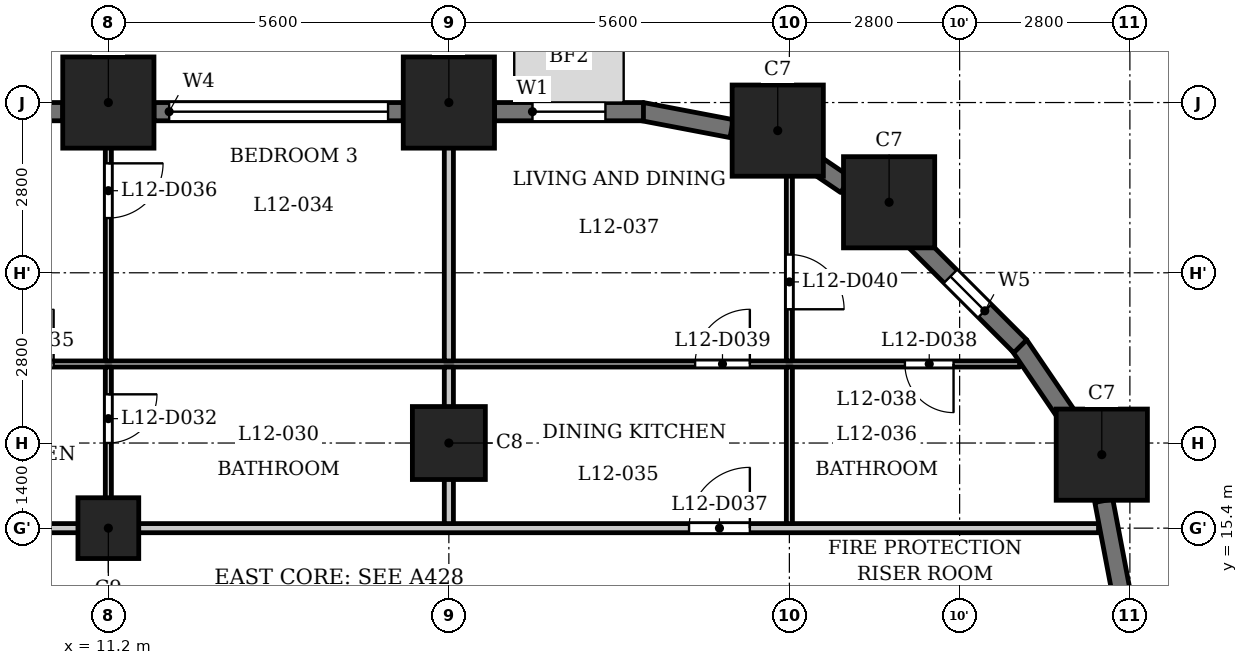
"""IFC4 building model, lengths in metres.
Left out: names, types, materials, properties, quantities, classifications, styles, units other than length and angle.
Written with IfcOpenShell. Run it as: python <this file> out.ifc"""

import sys

from ifc_helpers import new_model, si_unit, direction, frame, frame_2d, origin, origin_2d, place, context, subcontext, project, spatial, rectangle, extrude, element, fill, save


model = new_model("IFC4")
c1 = context("Model", 3, precision=1e-05, world=origin(), true_north=direction((0.0, 1.0)))
c2 = subcontext(c1, "Body", "Model", "MODEL_VIEW")
j1 = project(units=[si_unit("LENGTHUNIT", "METRE"), si_unit("PLANEANGLEUNIT", "RADIAN")], contexts=[c1])
p1 = place(None, origin())
s1 = spatial("IfcSite", under=j1, at=p1, CompositionType="ELEMENT")
p2 = place(p1, origin())
s2 = spatial("IfcBuilding", under=s1, at=p2, CompositionType="ELEMENT")
p3 = place(p2, frame((0.0, 0.0, 51.5)))
s3 = spatial("IfcBuildingStorey", under=s2, at=p3, CompositionType="ELEMENT", Elevation=51.5)
for number, where, z_axis, x_axis in (
    (1, (27.538, 16.609, 0.0), (0.0, 0.0, 1.0), (1.0, 0.0, 0.0)),
    (2, (24.04, 20.76, 0.0), (0.0, 0.0, 1.0), (1.0, 0.0, 0.0)),
    (3, (22.209, 21.938, 0.0), (0.0, 0.0, 1.0), (1.0, 0.0, 0.0)),
    (4, (16.8, 22.4, 0.0), (0.0, 0.0, 1.0), (1.0, 0.0, 0.0)),
    (5, (11.2, 22.4, 0.0), (0.0, 0.0, 1.0), (1.0, 0.0, 0.0)),
):
    element("IfcColumn", number, at=place(p3, frame(where, z_axis=z_axis, x_axis=x_axis)), inside=s3, PredefinedType="COLUMN", context=c2, shape_type="SweptSolid", body=[
        extrude(rectangle(XDim=1.5, YDim=1.5, at=origin_2d()), origin(), (0.0, 0.0, 1.0), 3.5),
    ])
p4 = place(p3, frame((16.8, 16.8, 0.0), z_axis=(0.0, 0.0, 1.0), x_axis=(1.0, 0.0, 0.0)))
e6 = element("IfcColumn", 6, at=p4, inside=s3, PredefinedType="COLUMN", context=c2, shape_type="SweptSolid", body=[
    extrude(rectangle(XDim=1.2, YDim=1.2, at=origin_2d()), origin(), (0.0, 0.0, 1.0), 3.5),
])
p5 = place(p3, frame((11.2, 15.4, 0.0), z_axis=(0.0, 0.0, 1.0), x_axis=(1.0, 0.0, 0.0)))
e7 = element("IfcColumn", 7, at=p5, inside=s3, PredefinedType="COLUMN", context=c2, shape_type="SweptSolid", body=[
    extrude(rectangle(XDim=1.0, YDim=1.0, at=origin_2d()), origin(), (0.0, 0.0, 1.0), 3.5),
])
for number, where, z_axis, x_axis in (
    (8, (27.853, 14.372, 0.0), (0.0, 0.0, 1.0), (-0.187, 0.982, 0.0)),
    (9, (27.025, 17.167, 0.0), (0.0, 0.0, 1.0), (-0.562, 0.827, 0.0)),
):
    element("IfcWall", number, at=place(p3, frame(where, z_axis=z_axis, x_axis=x_axis)), inside=s3, PredefinedType="SOLIDWALL", context=c2, shape_type="SweptSolid", body=[
        extrude(rectangle(XDim=1.506, YDim=0.3, at=frame_2d((0.753, 0.0))), origin(), (0.0, 0.0, 1.0), 2.35),
    ])
p6 = place(p3, frame((26.197, 18.391, 0.0), z_axis=(0.0, 0.0, 1.0), x_axis=(-0.707106781187, 0.707106781187, 0.0)))
e10 = element("IfcWall", 10, at=p6, inside=s3, PredefinedType="SOLIDWALL", context=c2, shape_type="SweptSolid", body=[
    extrude(rectangle(XDim=2.45, YDim=0.3, at=frame_2d((1.225, 0.0))), origin(), (0.0, 0.0, 1.0), 2.35),
])
p7 = place(p6, frame((0.825, 0.0, 0.6)))
e11 = element("IfcOpeningElement", 11, at=p7, cuts=e10, PredefinedType="OPENING", context=c2, shape_type="SweptSolid", body=[
    extrude(rectangle(XDim=0.8, YDim=1.55, at=frame_2d((0.4, 0.775))), frame((0.0, 0.16, 0.0), z_axis=(0.0, -1.0, 0.0), x_axis=(1.0, 0.0, 0.0)), (0.0, 0.0, 1.0), 0.32),
])
p8 = place(p3, frame((23.327, 21.045, 0.0), z_axis=(0.0, 0.0, 1.0), x_axis=(-0.827080706709, 0.562083182981, 0.0)))
e12 = element("IfcWall", 12, at=p8, inside=s3, PredefinedType="SOLIDWALL", context=c2, shape_type="SweptSolid", body=[
    extrude(rectangle(XDim=0.677, YDim=0.3, at=frame_2d((0.339, 0.0))), origin(), (0.0, 0.0, 1.0), 3.2),
])
p9 = place(p3, frame((21.451, 21.97, 0.0), z_axis=(0.0, 0.0, 1.0), x_axis=(-0.982287454367, 0.187380247071, 0.0)))
e13 = element("IfcWall", 13, at=p9, inside=s3, PredefinedType="SOLIDWALL", context=c2, shape_type="SweptSolid", body=[
    extrude(rectangle(XDim=1.506, YDim=0.3, at=frame_2d((0.753, 0.0))), origin(), (0.0, 0.0, 1.0), 2.35),
])
p10 = place(p3, frame((20.0, 22.25, 0.0), z_axis=(0.0, 0.0, 1.0), x_axis=(-1.0, 0.0, 0.0)))
e14 = element("IfcWall", 14, at=p10, inside=s3, PredefinedType="SOLIDWALL", context=c2, shape_type="SweptSolid", body=[
    extrude(rectangle(XDim=2.45, YDim=0.3, at=frame_2d((1.225, 0.0))), origin(), (0.0, 0.0, 1.0), 2.35),
])
p11 = place(p10, frame((0.625, 0.0, 0.6)))
e15 = element("IfcOpeningElement", 15, at=p11, cuts=e14, PredefinedType="OPENING", context=c2, shape_type="SweptSolid", body=[
    extrude(rectangle(XDim=1.2, YDim=1.55, at=frame_2d((0.6, 0.775))), frame((0.0, 0.16, 0.0), z_axis=(0.0, -1.0, 0.0), x_axis=(1.0, 0.0, 0.0)), (0.0, 0.0, 1.0), 0.32),
])
p12 = place(p3, frame((16.05, 22.25, 0.0), z_axis=(0.0, 0.0, 1.0), x_axis=(-1.0, 0.0, 0.0)))
e16 = element("IfcWall", 16, at=p12, inside=s3, PredefinedType="SOLIDWALL", context=c2, shape_type="SweptSolid", body=[
    extrude(rectangle(XDim=4.1, YDim=0.3, at=frame_2d((2.05, 0.0))), origin(), (0.0, 0.0, 1.0), 2.35),
])
p13 = place(p12, frame((0.25, 0.0, 1.2)))
e17 = element("IfcOpeningElement", 17, at=p13, cuts=e16, PredefinedType="OPENING", context=c2, shape_type="SweptSolid", body=[
    extrude(rectangle(XDim=3.6, YDim=0.95, at=frame_2d((1.8, 0.475))), frame((0.0, 0.16, 0.0), z_axis=(0.0, -1.0, 0.0), x_axis=(1.0, 0.0, 0.0)), (0.0, 0.0, 1.0), 0.32),
])
p14 = place(p3, frame((10.45, 22.25, 0.0), z_axis=(0.0, 0.0, 1.0), x_axis=(-1.0, 0.0, 0.0)))
e18 = element("IfcWall", 18, at=p14, inside=s3, PredefinedType="SOLIDWALL", context=c2, shape_type="SweptSolid", body=[
    extrude(rectangle(XDim=4.1, YDim=0.3, at=frame_2d((2.05, 0.0))), origin(), (0.0, 0.0, 1.0), 2.35),
])
p15 = place(p14, frame((0.25, 0.0, 1.2)))
e19 = element("IfcOpeningElement", 19, at=p15, cuts=e18, PredefinedType="OPENING", context=c2, shape_type="SweptSolid", body=[
    extrude(rectangle(XDim=3.6, YDim=0.95, at=frame_2d((1.8, 0.475))), frame((0.0, 0.16, 0.0), z_axis=(0.0, -1.0, 0.0), x_axis=(1.0, 0.0, 0.0)), (0.0, 0.0, 1.0), 0.32),
])
p16 = place(p3, frame((-27.484, 15.4, 0.0), z_axis=(0.0, 0.0, 1.0), x_axis=(1.0, 0.0, 0.0)))
e20 = element("IfcWall", 20, at=p16, inside=s3, PredefinedType="PARTITIONING", context=c2, shape_type="SweptSolid", body=[
    extrude(rectangle(XDim=54.968, YDim=0.15, at=frame_2d((27.484, 0.0))), origin(), (0.0, 0.0, 1.0), 3.2),
])
p17 = place(p16, frame((8.784, 0.0, 0.0)))
e21 = element("IfcOpeningElement", 21, at=p17, cuts=e20, PredefinedType="OPENING", context=c2, shape_type="SweptSolid", body=[
    extrude(rectangle(XDim=1.0, YDim=2.1, at=frame_2d((0.5, 1.05))), frame((0.0, 0.085, 0.0), z_axis=(0.0, -1.0, 0.0), x_axis=(1.0, 0.0, 0.0)), (0.0, 0.0, 1.0), 0.17),
])
p18 = place(p16, frame((12.034, 0.0, 0.0)))
e22 = element("IfcOpeningElement", 22, at=p18, cuts=e20, PredefinedType="OPENING", context=c2, shape_type="SweptSolid", body=[
    extrude(rectangle(XDim=1.0, YDim=2.1, at=frame_2d((0.5, 1.05))), frame((0.0, 0.085, 0.0), z_axis=(0.0, -1.0, 0.0), x_axis=(1.0, 0.0, 0.0)), (0.0, 0.0, 1.0), 0.17),
])
p19 = place(p16, frame((16.984, 0.0, 0.0)))
e23 = element("IfcOpeningElement", 23, at=p19, cuts=e20, PredefinedType="OPENING", context=c2, shape_type="SweptSolid", body=[
    extrude(rectangle(XDim=1.0, YDim=2.1, at=frame_2d((0.5, 1.05))), frame((0.0, 0.085, 0.0), z_axis=(0.0, -1.0, 0.0), x_axis=(1.0, 0.0, 0.0)), (0.0, 0.0, 1.0), 0.17),
])
p20 = place(p16, frame((28.184, 0.0, 0.0)))
e24 = element("IfcOpeningElement", 24, at=p20, cuts=e20, PredefinedType="OPENING", context=c2, shape_type="SweptSolid", body=[
    extrude(rectangle(XDim=1.0, YDim=2.1, at=frame_2d((0.5, 1.05))), frame((0.0, 0.085, 0.0), z_axis=(0.0, -1.0, 0.0), x_axis=(1.0, 0.0, 0.0)), (0.0, 0.0, 1.0), 0.17),
])
p21 = place(p16, frame((48.234, 0.0, 0.0)))
e25 = element("IfcOpeningElement", 25, at=p21, cuts=e20, PredefinedType="OPENING", context=c2, shape_type="SweptSolid", body=[
    extrude(rectangle(XDim=1.0, YDim=2.1, at=frame_2d((0.5, 1.05))), frame((0.0, 0.085, 0.0), z_axis=(0.0, -1.0, 0.0), x_axis=(1.0, 0.0, 0.0)), (0.0, 0.0, 1.0), 0.17),
])
p22 = place(p3, frame((-26.44, 18.1, 0.0), z_axis=(0.0, 0.0, 1.0), x_axis=(1.0, 0.0, 0.0)))
e26 = element("IfcWall", 26, at=p22, inside=s3, PredefinedType="PARTITIONING", context=c2, shape_type="SweptSolid", body=[
    extrude(rectangle(XDim=52.63, YDim=0.1, at=frame_2d((26.315, 0.0))), origin(), (0.0, 0.0, 1.0), 3.2),
])
p23 = place(p22, frame((2.626, 0.0, 0.0)))
e27 = element("IfcOpeningElement", 27, at=p23, cuts=e26, PredefinedType="OPENING", context=c2, shape_type="SweptSolid", body=[
    extrude(rectangle(XDim=0.8, YDim=2.1, at=frame_2d((0.4, 1.05))), frame((0.0, 0.06, 0.0), z_axis=(0.0, -1.0, 0.0), x_axis=(1.0, 0.0, 0.0)), (0.0, 0.0, 1.0), 0.12),
])
p24 = place(p22, frame((7.84, 0.0, 0.0)))
e28 = element("IfcOpeningElement", 28, at=p24, cuts=e26, PredefinedType="OPENING", context=c2, shape_type="SweptSolid", body=[
    extrude(rectangle(XDim=0.9, YDim=2.1, at=frame_2d((0.45, 1.05))), frame((0.0, 0.06, 0.0), z_axis=(0.0, -1.0, 0.0), x_axis=(1.0, 0.0, 0.0)), (0.0, 0.0, 1.0), 0.12),
])
p25 = place(p22, frame((13.79, 0.0, 0.0)))
e29 = element("IfcOpeningElement", 29, at=p25, cuts=e26, PredefinedType="OPENING", context=c2, shape_type="SweptSolid", body=[
    extrude(rectangle(XDim=0.8, YDim=2.1, at=frame_2d((0.4, 1.05))), frame((0.0, 0.06, 0.0), z_axis=(0.0, -1.0, 0.0), x_axis=(1.0, 0.0, 0.0)), (0.0, 0.0, 1.0), 0.12),
])
p26 = place(p22, frame((11.09, 0.0, 0.0)))
e30 = element("IfcOpeningElement", 30, at=p26, cuts=e26, PredefinedType="OPENING", context=c2, shape_type="SweptSolid", body=[
    extrude(rectangle(XDim=0.9, YDim=2.1, at=frame_2d((0.45, 1.05))), frame((0.0, 0.06, 0.0), z_axis=(0.0, -1.0, 0.0), x_axis=(1.0, 0.0, 0.0)), (0.0, 0.0, 1.0), 0.12),
])
p27 = place(p22, frame((21.49, 0.0, 0.0)))
e31 = element("IfcOpeningElement", 31, at=p27, cuts=e26, PredefinedType="OPENING", context=c2, shape_type="SweptSolid", body=[
    extrude(rectangle(XDim=0.8, YDim=2.1, at=frame_2d((0.4, 1.05))), frame((0.0, 0.06, 0.0), z_axis=(0.0, -1.0, 0.0), x_axis=(1.0, 0.0, 0.0)), (0.0, 0.0, 1.0), 0.12),
])
p28 = place(p22, frame((15.79, 0.0, 0.0)))
e32 = element("IfcOpeningElement", 32, at=p28, cuts=e26, PredefinedType="OPENING", context=c2, shape_type="SweptSolid", body=[
    extrude(rectangle(XDim=0.9, YDim=2.1, at=frame_2d((0.45, 1.05))), frame((0.0, 0.06, 0.0), z_axis=(0.0, -1.0, 0.0), x_axis=(1.0, 0.0, 0.0)), (0.0, 0.0, 1.0), 0.12),
])
p29 = place(p22, frame((27.49, 0.0, 0.0)))
e33 = element("IfcOpeningElement", 33, at=p29, cuts=e26, PredefinedType="OPENING", context=c2, shape_type="SweptSolid", body=[
    extrude(rectangle(XDim=0.9, YDim=2.1, at=frame_2d((0.45, 1.05))), frame((0.0, 0.06, 0.0), z_axis=(0.0, -1.0, 0.0), x_axis=(1.0, 0.0, 0.0)), (0.0, 0.0, 1.0), 0.12),
])
p30 = place(p22, frame((29.74, 0.0, 0.0)))
e34 = element("IfcOpeningElement", 34, at=p30, cuts=e26, PredefinedType="OPENING", context=c2, shape_type="SweptSolid", body=[
    extrude(rectangle(XDim=0.9, YDim=2.1, at=frame_2d((0.45, 1.05))), frame((0.0, 0.06, 0.0), z_axis=(0.0, -1.0, 0.0), x_axis=(1.0, 0.0, 0.0)), (0.0, 0.0, 1.0), 0.12),
])
p31 = place(p22, frame((35.84, 0.0, 0.0)))
e35 = element("IfcOpeningElement", 35, at=p31, cuts=e26, PredefinedType="OPENING", context=c2, shape_type="SweptSolid", body=[
    extrude(rectangle(XDim=0.9, YDim=2.1, at=frame_2d((0.45, 1.05))), frame((0.0, 0.06, 0.0), z_axis=(0.0, -1.0, 0.0), x_axis=(1.0, 0.0, 0.0)), (0.0, 0.0, 1.0), 0.12),
])
p32 = place(p22, frame((50.74, 0.0, 0.0)))
e36 = element("IfcOpeningElement", 36, at=p32, cuts=e26, PredefinedType="OPENING", context=c2, shape_type="SweptSolid", body=[
    extrude(rectangle(XDim=0.8, YDim=2.1, at=frame_2d((0.4, 1.05))), frame((0.0, 0.06, 0.0), z_axis=(0.0, -1.0, 0.0), x_axis=(1.0, 0.0, 0.0)), (0.0, 0.0, 1.0), 0.12),
])
p33 = place(p22, frame((47.29, 0.0, 0.0)))
e37 = element("IfcOpeningElement", 37, at=p33, cuts=e26, PredefinedType="OPENING", context=c2, shape_type="SweptSolid", body=[
    extrude(rectangle(XDim=0.9, YDim=2.1, at=frame_2d((0.45, 1.05))), frame((0.0, 0.06, 0.0), z_axis=(0.0, -1.0, 0.0), x_axis=(1.0, 0.0, 0.0)), (0.0, 0.0, 1.0), 0.12),
])
p34 = place(p3, frame((11.2, 15.475, 0.0), z_axis=(0.0, 0.0, 1.0), x_axis=(0.0, 1.0, 0.0)))
e38 = element("IfcWall", 38, at=p34, inside=s3, PredefinedType="PARTITIONING", context=c2, shape_type="SweptSolid", body=[
    extrude(rectangle(XDim=2.575, YDim=0.1, at=frame_2d((1.288, 0.0))), origin(), (0.0, 0.0, 1.0), 3.2),
])
p35 = place(p34, frame((1.326, 0.0, 0.0)))
e39 = element("IfcOpeningElement", 39, at=p35, cuts=e38, PredefinedType="OPENING", context=c2, shape_type="SweptSolid", body=[
    extrude(rectangle(XDim=0.8, YDim=2.1, at=frame_2d((0.4, 1.05))), frame((0.0, 0.06, 0.0), z_axis=(0.0, -1.0, 0.0), x_axis=(1.0, 0.0, 0.0)), (0.0, 0.0, 1.0), 0.12),
])
p36 = place(p3, frame((11.2, 18.15, 0.0), z_axis=(0.0, 0.0, 1.0), x_axis=(0.0, 1.0, 0.0)))
e40 = element("IfcWall", 40, at=p36, inside=s3, PredefinedType="PARTITIONING", context=c2, shape_type="SweptSolid", body=[
    extrude(rectangle(XDim=4.98, YDim=0.1, at=frame_2d((2.49, 0.0))), origin(), (0.0, 0.0, 1.0), 3.2),
])
p37 = place(p36, frame((2.35, 0.0, 0.0)))
e41 = element("IfcOpeningElement", 41, at=p37, cuts=e40, PredefinedType="OPENING", context=c2, shape_type="SweptSolid", body=[
    extrude(rectangle(XDim=0.9, YDim=2.1, at=frame_2d((0.45, 1.05))), frame((0.0, 0.06, 0.0), z_axis=(0.0, -1.0, 0.0), x_axis=(1.0, 0.0, 0.0)), (0.0, 0.0, 1.0), 0.12),
])
p38 = place(p3, frame((16.8, 15.475, 0.0), z_axis=(0.0, 0.0, 1.0), x_axis=(0.0, 1.0, 0.0)))
e42 = element("IfcWall", 42, at=p38, inside=s3, PredefinedType="PARTITIONING", context=c2, shape_type="SweptSolid", body=[
    extrude(rectangle(XDim=2.575, YDim=0.15, at=frame_2d((1.288, 0.0))), origin(), (0.0, 0.0, 1.0), 3.2),
])
p39 = place(p3, frame((16.8, 18.15, 0.0), z_axis=(0.0, 0.0, 1.0), x_axis=(0.0, 1.0, 0.0)))
e43 = element("IfcWall", 43, at=p39, inside=s3, PredefinedType="PARTITIONING", context=c2, shape_type="SweptSolid", body=[
    extrude(rectangle(XDim=4.98, YDim=0.15, at=frame_2d((2.49, 0.0))), origin(), (0.0, 0.0, 1.0), 3.2),
])
p40 = place(p3, frame((22.4, 15.475, 0.0), z_axis=(0.0, 0.0, 1.0), x_axis=(0.0, 1.0, 0.0)))
e44 = element("IfcWall", 44, at=p40, inside=s3, PredefinedType="PARTITIONING", context=c2, shape_type="SweptSolid", body=[
    extrude(rectangle(XDim=2.575, YDim=0.1, at=frame_2d((1.288, 0.0))), origin(), (0.0, 0.0, 1.0), 3.2),
])
p41 = place(p3, frame((22.4, 18.15, 0.0), z_axis=(0.0, 0.0, 1.0), x_axis=(0.0, 1.0, 0.0)))
e45 = element("IfcWall", 45, at=p41, inside=s3, PredefinedType="PARTITIONING", context=c2, shape_type="SweptSolid", body=[
    extrude(rectangle(XDim=3.57, YDim=0.1, at=frame_2d((1.785, 0.0))), origin(), (0.0, 0.0, 1.0), 3.2),
])
p42 = place(p41, frame((0.85, 0.0, 0.0)))
e46 = element("IfcOpeningElement", 46, at=p42, cuts=e45, PredefinedType="OPENING", context=c2, shape_type="SweptSolid", body=[
    extrude(rectangle(XDim=0.9, YDim=2.1, at=frame_2d((0.45, 1.05))), frame((0.0, 0.06, 0.0), z_axis=(0.0, -1.0, 0.0), x_axis=(1.0, 0.0, 0.0)), (0.0, 0.0, 1.0), 0.12),
])
p43 = place(p35, origin())
e47 = element("IfcDoor", 47, at=p43, inside=s3, OperationType="SINGLE_SWING_RIGHT", PredefinedType="DOOR", context=c2, shape_type="SweptSolid", body=[
    extrude(rectangle(XDim=0.8, YDim=2.1, at=frame_2d((0.4, 1.05))), frame((0.0, 0.025, 0.0), z_axis=(0.0, -1.0, 0.0), x_axis=(1.0, 0.0, 0.0)), (0.0, 0.0, 1.0), 0.05),
])
fill(e39, e47)
p44 = place(p31, origin())
e48 = element("IfcDoor", 48, at=p44, inside=s3, OperationType="SINGLE_SWING_LEFT", PredefinedType="DOOR", context=c2, shape_type="SweptSolid", body=[
    extrude(rectangle(XDim=0.9, YDim=2.1, at=frame_2d((0.45, 1.05))), frame((0.0, 0.025, 0.0), z_axis=(0.0, -1.0, 0.0), x_axis=(1.0, 0.0, 0.0)), (0.0, 0.0, 1.0), 0.05),
])
fill(e35, e48)
p45 = place(p37, origin())
e49 = element("IfcDoor", 49, at=p45, inside=s3, OperationType="SINGLE_SWING_RIGHT", PredefinedType="DOOR", context=c2, shape_type="SweptSolid", body=[
    extrude(rectangle(XDim=0.9, YDim=2.1, at=frame_2d((0.45, 1.05))), frame((0.0, 0.025, 0.0), z_axis=(0.0, -1.0, 0.0), x_axis=(1.0, 0.0, 0.0)), (0.0, 0.0, 1.0), 0.05),
])
fill(e41, e49)
p46 = place(p21, origin())
e50 = element("IfcDoor", 50, at=p46, inside=s3, OperationType="SINGLE_SWING_LEFT", PredefinedType="DOOR", context=c2, shape_type="SweptSolid", body=[
    extrude(rectangle(XDim=1.0, YDim=2.1, at=frame_2d((0.5, 1.05))), frame((0.0, 0.025, 0.0), z_axis=(0.0, -1.0, 0.0), x_axis=(1.0, 0.0, 0.0)), (0.0, 0.0, 1.0), 0.05),
])
fill(e25, e50)
p47 = place(p32, origin())
e51 = element("IfcDoor", 51, at=p47, inside=s3, OperationType="SINGLE_SWING_RIGHT", PredefinedType="DOOR", context=c2, shape_type="SweptSolid", body=[
    extrude(rectangle(XDim=0.8, YDim=2.1, at=frame_2d((0.4, 1.05))), frame((0.0, 0.025, 0.0), z_axis=(0.0, -1.0, 0.0), x_axis=(1.0, 0.0, 0.0)), (0.0, 0.0, 1.0), 0.05),
])
fill(e36, e51)
p48 = place(p33, origin())
e52 = element("IfcDoor", 52, at=p48, inside=s3, OperationType="SINGLE_SWING_LEFT", PredefinedType="DOOR", context=c2, shape_type="SweptSolid", body=[
    extrude(rectangle(XDim=0.9, YDim=2.1, at=frame_2d((0.45, 1.05))), frame((0.0, 0.025, 0.0), z_axis=(0.0, -1.0, 0.0), x_axis=(1.0, 0.0, 0.0)), (0.0, 0.0, 1.0), 0.05),
])
fill(e37, e52)
p49 = place(p42, origin())
e53 = element("IfcDoor", 53, at=p49, inside=s3, OperationType="SINGLE_SWING_LEFT", PredefinedType="DOOR", context=c2, shape_type="SweptSolid", body=[
    extrude(rectangle(XDim=0.9, YDim=2.1, at=frame_2d((0.45, 1.05))), frame((0.0, 0.025, 0.0), z_axis=(0.0, -1.0, 0.0), x_axis=(1.0, 0.0, 0.0)), (0.0, 0.0, 1.0), 0.05),
])
fill(e46, e53)
p50 = place(p7, origin())
e54 = element("IfcWindow", 54, at=p50, inside=s3, PartitioningType="SINGLE_PANEL", PredefinedType="WINDOW", context=c2, shape_type="SweptSolid", body=[
    extrude(rectangle(XDim=0.8, YDim=1.55, at=frame_2d((0.4, 0.775))), frame((0.0, 0.03, 0.0), z_axis=(0.0, -1.0, 0.0), x_axis=(1.0, 0.0, 0.0)), (0.0, 0.0, 1.0), 0.06),
])
fill(e11, e54)
p51 = place(p11, origin())
e55 = element("IfcWindow", 55, at=p51, inside=s3, PartitioningType="SINGLE_PANEL", PredefinedType="WINDOW", context=c2, shape_type="SweptSolid", body=[
    extrude(rectangle(XDim=1.2, YDim=1.55, at=frame_2d((0.6, 0.775))), frame((0.0, 0.03, 0.0), z_axis=(0.0, -1.0, 0.0), x_axis=(1.0, 0.0, 0.0)), (0.0, 0.0, 1.0), 0.06),
])
fill(e15, e55)
p52 = place(p13, origin())
e56 = element("IfcWindow", 56, at=p52, inside=s3, PartitioningType="SINGLE_PANEL", PredefinedType="WINDOW", context=c2, shape_type="SweptSolid", body=[
    extrude(rectangle(XDim=3.6, YDim=0.95, at=frame_2d((1.8, 0.475))), frame((0.0, 0.03, 0.0), z_axis=(0.0, -1.0, 0.0), x_axis=(1.0, 0.0, 0.0)), (0.0, 0.0, 1.0), 0.06),
])
fill(e17, e56)
save(model, sys.argv[1])
